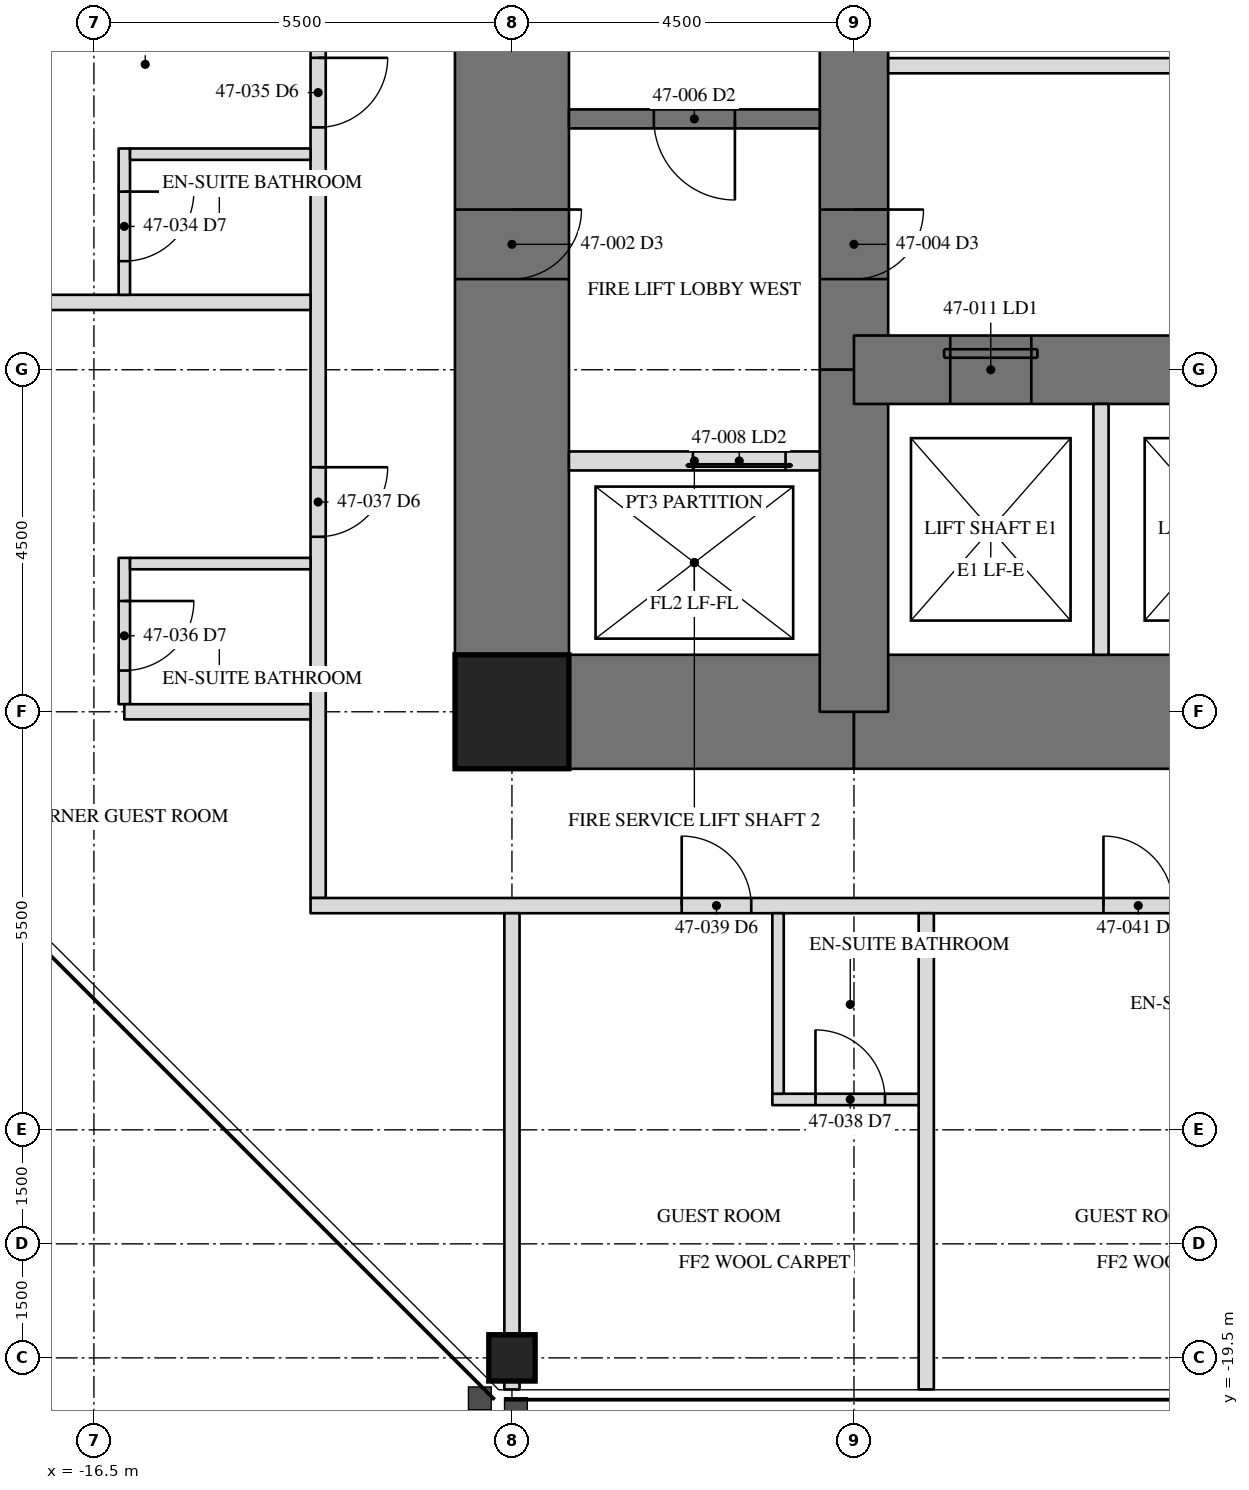
"""IFC4 building model, lengths in metres.
Left out: names, types, materials, properties, quantities, classifications, styles, units other than length and angle.
Written with IfcOpenShell. Run it as: python <this file> out.ifc"""

import sys

from ifc_helpers import new_model, si_unit, direction, frame, frame_2d, origin, origin_2d, place, context, subcontext, project, spatial, rectangle, hollow_rectangle, extrude, element, fill, save


model = new_model("IFC4")
c1 = context("Model", 3, precision=1e-05, world=origin(), true_north=direction((0.0, 1.0)))
c2 = subcontext(c1, "Body", "Model", "MODEL_VIEW")
j1 = project(units=[si_unit("LENGTHUNIT", "METRE"), si_unit("PLANEANGLEUNIT", "RADIAN")], contexts=[c1])
p1 = place(None, origin())
s1 = spatial("IfcSite", under=j1, at=p1, CompositionType="ELEMENT")
p2 = place(p1, origin())
s2 = spatial("IfcBuilding", under=s1, at=p2, CompositionType="ELEMENT")
p3 = place(p2, frame((0.0, 0.0, 201.2)))
s3 = spatial("IfcBuildingStorey", under=s2, at=p3, CompositionType="ELEMENT", Elevation=201.2)
p4 = place(p3, frame((-11.0, -19.5, 0.0), z_axis=(0.0, 0.0, 1.0), x_axis=(1.0, 0.0, 0.0)))
e1 = element("IfcColumn", 1, at=p4, inside=s3, PredefinedType="COLUMN", context=c2, shape_type="SweptSolid", body=[
    extrude(hollow_rectangle(XDim=0.61, YDim=0.61, WallThickness=0.076, at=origin_2d()), origin(), (0.0, 0.0, 1.0), 3.5),
])
p5 = place(p3, frame((-11.0, 11.0, 0.0), z_axis=(0.0, 0.0, 1.0), x_axis=(0.0, -1.0, 0.0)))
e2 = element("IfcWall", 2, at=p5, inside=s3, PredefinedType="SHEAR", context=c2, shape_type="SweptSolid", body=[
    extrude(rectangle(XDim=22.0, YDim=1.5, at=frame_2d((11.0, 0.0))), origin(), (0.0, 0.0, 1.0), 3.5),
])
p6 = place(p5, frame((15.393, 0.0, 0.0)))
e3 = element("IfcOpeningElement", 3, at=p6, cuts=e2, PredefinedType="OPENING", context=c2, shape_type="SweptSolid", body=[
    extrude(rectangle(XDim=0.915, YDim=2.134, at=frame_2d((0.458, 1.067))), frame((0.0, 0.76, 0.0), z_axis=(0.0, -1.0, 0.0), x_axis=(1.0, 0.0, 0.0)), (0.0, 0.0, 1.0), 1.52),
])
p7 = place(p3, frame((-11.0, -11.0, 0.0), z_axis=(0.0, 0.0, 1.0), x_axis=(1.0, 0.0, 0.0)))
e4 = element("IfcWall", 4, at=p7, inside=s3, PredefinedType="SHEAR", context=c2, shape_type="SweptSolid", body=[
    extrude(rectangle(XDim=4.5, YDim=1.5, at=frame_2d((2.25, 0.0))), origin(), (0.0, 0.0, 1.0), 3.5),
])
p8 = place(p3, frame((-6.5, -11.0, 0.0), z_axis=(0.0, 0.0, 1.0), x_axis=(1.0, 0.0, 0.0)))
e5 = element("IfcWall", 5, at=p8, inside=s3, PredefinedType="SHEAR", context=c2, shape_type="SweptSolid", body=[
    extrude(rectangle(XDim=13.0, YDim=1.5, at=frame_2d((6.5, 0.0))), origin(), (0.0, 0.0, 1.0), 3.5),
])
p9 = place(p3, frame((-6.5, 6.5, 0.0), z_axis=(0.0, 0.0, 1.0), x_axis=(0.0, -1.0, 0.0)))
e6 = element("IfcWall", 6, at=p9, inside=s3, PredefinedType="SHEAR", context=c2, shape_type="SweptSolid", body=[
    extrude(rectangle(XDim=13.0, YDim=0.9, at=frame_2d((6.5, 0.0))), origin(), (0.0, 0.0, 1.0), 3.5),
])
p10 = place(p9, frame((10.893, 0.0, 0.0)))
e7 = element("IfcOpeningElement", 7, at=p10, cuts=e6, PredefinedType="OPENING", context=c2, shape_type="SweptSolid", body=[
    extrude(rectangle(XDim=0.915, YDim=2.134, at=frame_2d((0.458, 1.067))), frame((0.0, 0.46, 0.0), z_axis=(0.0, -1.0, 0.0), x_axis=(1.0, 0.0, 0.0)), (0.0, 0.0, 1.0), 0.92),
])
p11 = place(p9, frame((0.61, 0.0, 0.0)))
e8 = element("IfcOpeningElement", 8, at=p11, cuts=e6, PredefinedType="OPENING", context=c2, shape_type="SweptSolid", body=[
    extrude(rectangle(XDim=0.915, YDim=2.134, at=frame_2d((0.458, 1.067))), frame((0.0, 0.46, 0.0), z_axis=(0.0, -1.0, 0.0), x_axis=(1.0, 0.0, 0.0)), (0.0, 0.0, 1.0), 0.92),
])
p12 = place(p3, frame((-6.5, -6.5, 0.0), z_axis=(0.0, 0.0, 1.0), x_axis=(0.0, -1.0, 0.0)))
e9 = element("IfcWall", 9, at=p12, inside=s3, PredefinedType="SHEAR", context=c2, shape_type="SweptSolid", body=[
    extrude(rectangle(XDim=4.5, YDim=0.9, at=frame_2d((2.25, 0.0))), origin(), (0.0, 0.0, 1.0), 3.5),
])
p13 = place(p3, frame((-6.5, -6.5, 0.0), z_axis=(0.0, 0.0, 1.0), x_axis=(1.0, 0.0, 0.0)))
e10 = element("IfcWall", 10, at=p13, inside=s3, PredefinedType="SHEAR", context=c2, shape_type="SweptSolid", body=[
    extrude(rectangle(XDim=13.0, YDim=0.9, at=frame_2d((6.5, 0.0))), origin(), (0.0, 0.0, 1.0), 3.5),
])
p14 = place(p13, frame((1.267, 0.0, 0.0)))
e11 = element("IfcOpeningElement", 11, at=p14, cuts=e10, PredefinedType="OPENING", context=c2, shape_type="SweptSolid", body=[
    extrude(rectangle(XDim=1.067, YDim=2.134, at=frame_2d((0.533, 1.067))), frame((0.0, 0.46, 0.0), z_axis=(0.0, -1.0, 0.0), x_axis=(1.0, 0.0, 0.0)), (0.0, 0.0, 1.0), 0.92),
])
p15 = place(p13, frame((4.342, 0.0, 0.0)))
e12 = element("IfcOpeningElement", 12, at=p15, cuts=e10, PredefinedType="OPENING", context=c2, shape_type="SweptSolid", body=[
    extrude(rectangle(XDim=1.067, YDim=2.134, at=frame_2d((0.533, 1.067))), frame((0.0, 0.46, 0.0), z_axis=(0.0, -1.0, 0.0), x_axis=(1.0, 0.0, 0.0)), (0.0, 0.0, 1.0), 0.92),
])
p16 = place(p3, frame((-11.0, -11.0, 0.0), z_axis=(0.0, 0.0, 1.0), x_axis=(1.0, 0.0, 0.0)))
e13 = element("IfcColumn", 13, at=p16, inside=s3, PredefinedType="COLUMN", context=c2, shape_type="SweptSolid", body=[
    extrude(hollow_rectangle(XDim=1.499, YDim=1.499, WallThickness=0.102, at=origin_2d()), origin(), (0.0, 0.0, 1.0), 3.5),
])
p17 = place(p3, frame((-6.95, -3.2, 0.0), z_axis=(0.0, 0.0, 1.0), x_axis=(-1.0, 0.0, 0.0)))
e14 = element("IfcWall", 14, at=p17, inside=s3, PredefinedType="SOLIDWALL", context=c2, shape_type="SweptSolid", body=[
    extrude(rectangle(XDim=3.3, YDim=0.25, at=frame_2d((1.65, 0.0))), origin(), (0.0, 0.0, 1.0), 3.31),
])
p18 = place(p17, frame((1.116, 0.0, 0.0)))
e15 = element("IfcOpeningElement", 15, at=p18, cuts=e14, PredefinedType="OPENING", context=c2, shape_type="SweptSolid", body=[
    extrude(rectangle(XDim=1.067, YDim=2.134, at=frame_2d((0.533, 1.067))), frame((0.0, 0.135, 0.0), z_axis=(0.0, -1.0, 0.0), x_axis=(1.0, 0.0, 0.0)), (0.0, 0.0, 1.0), 0.27),
])
p19 = place(p3, frame((-6.95, -7.7, 0.0), z_axis=(0.0, 0.0, 1.0), x_axis=(-1.0, 0.0, 0.0)))
e16 = element("IfcWall", 16, at=p19, inside=s3, PredefinedType="PARTITIONING", context=c2, shape_type="SweptSolid", body=[
    extrude(rectangle(XDim=3.3, YDim=0.25, at=frame_2d((1.65, 0.0))), origin(), (0.0, 0.0, 1.0), 3.31),
])
p20 = place(p19, frame((0.45, 0.0, 0.0)))
e17 = element("IfcOpeningElement", 17, at=p20, cuts=e16, PredefinedType="OPENING", context=c2, shape_type="SweptSolid", body=[
    extrude(rectangle(XDim=1.219, YDim=2.134, at=frame_2d((0.609, 1.067))), frame((0.0, 0.135, 0.0), z_axis=(0.0, -1.0, 0.0), x_axis=(1.0, 0.0, 0.0)), (0.0, 0.0, 1.0), 0.27),
])
p21 = place(p3, frame((6.05, -2.5, 0.0), z_axis=(0.0, 0.0, 1.0), x_axis=(-1.0, 0.0, 0.0)))
e18 = element("IfcWall", 18, at=p21, inside=s3, PredefinedType="PARTITIONING", context=c2, shape_type="SweptSolid", body=[
    extrude(rectangle(XDim=12.1, YDim=0.2, at=frame_2d((6.05, 0.0))), origin(), (0.0, 0.0, 1.0), 3.31),
])
p22 = place(p3, frame((-3.25, -10.25, 0.0), z_axis=(0.0, 0.0, 1.0), x_axis=(0.0, 1.0, 0.0)))
e19 = element("IfcWall", 19, at=p22, inside=s3, PredefinedType="PARTITIONING", context=c2, shape_type="SweptSolid", body=[
    extrude(rectangle(XDim=3.3, YDim=0.2, at=frame_2d((1.65, 0.0))), origin(), (0.0, 0.0, 1.0), 3.31),
])
p23 = place(p3, frame((-13.55, 13.65, 0.0), z_axis=(0.0, 0.0, 1.0), x_axis=(0.0, -1.0, 0.0)))
e20 = element("IfcWall", 20, at=p23, inside=s3, PredefinedType="PARTITIONING", context=c2, shape_type="SweptSolid", body=[
    extrude(rectangle(XDim=27.1, YDim=0.2, at=frame_2d((13.55, 0.0))), origin(), (0.0, 0.0, 1.0), 3.31),
])
p24 = place(p23, frame((4.884, 0.0, 0.0)))
e21 = element("IfcOpeningElement", 21, at=p24, cuts=e20, PredefinedType="OPENING", context=c2, shape_type="SweptSolid", body=[
    extrude(rectangle(XDim=0.915, YDim=2.134, at=frame_2d((0.458, 1.067))), frame((0.0, 0.11, 0.0), z_axis=(0.0, -1.0, 0.0), x_axis=(1.0, 0.0, 0.0)), (0.0, 0.0, 1.0), 0.22),
])
p25 = place(p23, frame((10.433, 0.0, 0.0)))
e22 = element("IfcOpeningElement", 22, at=p25, cuts=e20, PredefinedType="OPENING", context=c2, shape_type="SweptSolid", body=[
    extrude(rectangle(XDim=0.915, YDim=2.134, at=frame_2d((0.458, 1.067))), frame((0.0, 0.11, 0.0), z_axis=(0.0, -1.0, 0.0), x_axis=(1.0, 0.0, 0.0)), (0.0, 0.0, 1.0), 0.22),
])
p26 = place(p23, frame((16.046, 0.0, 0.0)))
e23 = element("IfcOpeningElement", 23, at=p26, cuts=e20, PredefinedType="OPENING", context=c2, shape_type="SweptSolid", body=[
    extrude(rectangle(XDim=0.915, YDim=2.134, at=frame_2d((0.458, 1.067))), frame((0.0, 0.11, 0.0), z_axis=(0.0, -1.0, 0.0), x_axis=(1.0, 0.0, 0.0)), (0.0, 0.0, 1.0), 0.22),
])
p27 = place(p23, frame((21.433, 0.0, 0.0)))
e24 = element("IfcOpeningElement", 24, at=p27, cuts=e20, PredefinedType="OPENING", context=c2, shape_type="SweptSolid", body=[
    extrude(rectangle(XDim=0.915, YDim=2.134, at=frame_2d((0.458, 1.067))), frame((0.0, 0.11, 0.0), z_axis=(0.0, -1.0, 0.0), x_axis=(1.0, 0.0, 0.0)), (0.0, 0.0, 1.0), 0.22),
])
p28 = place(p3, frame((-13.65, -13.55, 0.0), z_axis=(0.0, 0.0, 1.0), x_axis=(1.0, 0.0, 0.0)))
e25 = element("IfcWall", 25, at=p28, inside=s3, PredefinedType="PARTITIONING", context=c2, shape_type="SweptSolid", body=[
    extrude(rectangle(XDim=27.1, YDim=0.2, at=frame_2d((13.55, 0.0))), origin(), (0.0, 0.0, 1.0), 3.31),
])
p29 = place(p28, frame((4.884, 0.0, 0.0)))
e26 = element("IfcOpeningElement", 26, at=p29, cuts=e25, PredefinedType="OPENING", context=c2, shape_type="SweptSolid", body=[
    extrude(rectangle(XDim=0.915, YDim=2.134, at=frame_2d((0.458, 1.067))), frame((0.0, 0.11, 0.0), z_axis=(0.0, -1.0, 0.0), x_axis=(1.0, 0.0, 0.0)), (0.0, 0.0, 1.0), 0.22),
])
p30 = place(p28, frame((10.433, 0.0, 0.0)))
e27 = element("IfcOpeningElement", 27, at=p30, cuts=e25, PredefinedType="OPENING", context=c2, shape_type="SweptSolid", body=[
    extrude(rectangle(XDim=0.915, YDim=2.134, at=frame_2d((0.458, 1.067))), frame((0.0, 0.11, 0.0), z_axis=(0.0, -1.0, 0.0), x_axis=(1.0, 0.0, 0.0)), (0.0, 0.0, 1.0), 0.22),
])
p31 = place(p28, frame((16.046, 0.0, 0.0)))
e28 = element("IfcOpeningElement", 28, at=p31, cuts=e25, PredefinedType="OPENING", context=c2, shape_type="SweptSolid", body=[
    extrude(rectangle(XDim=0.915, YDim=2.134, at=frame_2d((0.458, 1.067))), frame((0.0, 0.11, 0.0), z_axis=(0.0, -1.0, 0.0), x_axis=(1.0, 0.0, 0.0)), (0.0, 0.0, 1.0), 0.22),
])
p32 = place(p28, frame((21.433, 0.0, 0.0)))
e29 = element("IfcOpeningElement", 29, at=p32, cuts=e25, PredefinedType="OPENING", context=c2, shape_type="SweptSolid", body=[
    extrude(rectangle(XDim=0.915, YDim=2.134, at=frame_2d((0.458, 1.067))), frame((0.0, 0.11, 0.0), z_axis=(0.0, -1.0, 0.0), x_axis=(1.0, 0.0, 0.0)), (0.0, 0.0, 1.0), 0.22),
])
p33 = place(p3, frame((-13.65, -5.614, 0.0), z_axis=(0.0, 0.0, 1.0), x_axis=(-1.0, 0.0, 0.0)))
e30 = element("IfcWall", 30, at=p33, inside=s3, PredefinedType="PARTITIONING", context=c2, shape_type="SweptSolid", body=[
    extrude(rectangle(XDim=6.265, YDim=0.2, at=frame_2d((3.133, 0.0))), origin(), (0.0, 0.0, 1.0), 3.31),
])
p34 = place(p3, frame((-16.1, -3.589, 0.0), z_axis=(0.0, 0.0, 1.0), x_axis=(0.0, -1.0, 0.0)))
e31 = element("IfcWall", 31, at=p34, inside=s3, PredefinedType="PARTITIONING", context=c2, shape_type="SweptSolid", body=[
    extrude(rectangle(XDim=1.925, YDim=0.15, at=frame_2d((0.962, 0.0))), origin(), (0.0, 0.0, 1.0), 3.31),
])
p35 = place(p34, frame((0.567, 0.0, 0.0)))
e32 = element("IfcOpeningElement", 32, at=p35, cuts=e31, PredefinedType="OPENING", context=c2, shape_type="SweptSolid", body=[
    extrude(rectangle(XDim=0.915, YDim=2.032, at=frame_2d((0.458, 1.016))), frame((0.0, 0.085, 0.0), z_axis=(0.0, -1.0, 0.0), x_axis=(1.0, 0.0, 0.0)), (0.0, 0.0, 1.0), 0.17),
])
p36 = place(p3, frame((-13.65, -3.664, 0.0), z_axis=(0.0, 0.0, 1.0), x_axis=(-1.0, 0.0, 0.0)))
e33 = element("IfcWall", 33, at=p36, inside=s3, PredefinedType="PARTITIONING", context=c2, shape_type="SweptSolid", body=[
    extrude(rectangle(XDim=2.375, YDim=0.15, at=frame_2d((1.188, 0.0))), origin(), (0.0, 0.0, 1.0), 2.703),
])
p37 = place(p3, frame((-16.1, -8.975, 0.0), z_axis=(0.0, 0.0, 1.0), x_axis=(0.0, -1.0, 0.0)))
e34 = element("IfcWall", 34, at=p37, inside=s3, PredefinedType="PARTITIONING", context=c2, shape_type="SweptSolid", body=[
    extrude(rectangle(XDim=1.925, YDim=0.15, at=frame_2d((0.962, 0.0))), origin(), (0.0, 0.0, 1.0), 3.31),
])
p38 = place(p37, frame((0.567, 0.0, 0.0)))
e35 = element("IfcOpeningElement", 35, at=p38, cuts=e34, PredefinedType="OPENING", context=c2, shape_type="SweptSolid", body=[
    extrude(rectangle(XDim=0.915, YDim=2.032, at=frame_2d((0.458, 1.016))), frame((0.0, 0.085, 0.0), z_axis=(0.0, -1.0, 0.0), x_axis=(1.0, 0.0, 0.0)), (0.0, 0.0, 1.0), 0.17),
])
p39 = place(p3, frame((-13.65, -9.05, 0.0), z_axis=(0.0, 0.0, 1.0), x_axis=(-1.0, 0.0, 0.0)))
e36 = element("IfcWall", 36, at=p39, inside=s3, PredefinedType="PARTITIONING", context=c2, shape_type="SweptSolid", body=[
    extrude(rectangle(XDim=2.375, YDim=0.15, at=frame_2d((1.188, 0.0))), origin(), (0.0, 0.0, 1.0), 3.31),
])
p40 = place(p3, frame((-13.65, -11.0, 0.0), z_axis=(0.0, 0.0, 1.0), x_axis=(-1.0, 0.0, 0.0)))
e37 = element("IfcWall", 37, at=p40, inside=s3, PredefinedType="PARTITIONING", context=c2, shape_type="SweptSolid", body=[
    extrude(rectangle(XDim=2.45, YDim=0.2, at=frame_2d((1.225, 0.0))), origin(), (0.0, 0.0, 1.0), 2.802),
])
p41 = place(p3, frame((-11.0, -13.65, 0.0), z_axis=(0.0, 0.0, 1.0), x_axis=(0.0, -1.0, 0.0)))
e38 = element("IfcWall", 38, at=p41, inside=s3, PredefinedType="PARTITIONING", context=c2, shape_type="SweptSolid", body=[
    extrude(rectangle(XDim=6.265, YDim=0.2, at=frame_2d((3.133, 0.0))), origin(), (0.0, 0.0, 1.0), 2.802),
])
p42 = place(p3, frame((-5.549, -13.65, 0.0), z_axis=(0.0, 0.0, 1.0), x_axis=(0.0, -1.0, 0.0)))
e39 = element("IfcWall", 39, at=p42, inside=s3, PredefinedType="PARTITIONING", context=c2, shape_type="SweptSolid", body=[
    extrude(rectangle(XDim=6.265, YDim=0.2, at=frame_2d((3.133, 0.0))), origin(), (0.0, 0.0, 1.0), 3.31),
])
p43 = place(p3, frame((-7.574, -16.1, 0.0), z_axis=(0.0, 0.0, 1.0), x_axis=(1.0, 0.0, 0.0)))
e40 = element("IfcWall", 40, at=p43, inside=s3, PredefinedType="PARTITIONING", context=c2, shape_type="SweptSolid", body=[
    extrude(rectangle(XDim=1.925, YDim=0.15, at=frame_2d((0.962, 0.0))), origin(), (0.0, 0.0, 1.0), 3.31),
])
p44 = place(p43, frame((0.567, 0.0, 0.0)))
e41 = element("IfcOpeningElement", 41, at=p44, cuts=e40, PredefinedType="OPENING", context=c2, shape_type="SweptSolid", body=[
    extrude(rectangle(XDim=0.915, YDim=2.032, at=frame_2d((0.458, 1.016))), frame((0.0, 0.085, 0.0), z_axis=(0.0, -1.0, 0.0), x_axis=(1.0, 0.0, 0.0)), (0.0, 0.0, 1.0), 0.17),
])
p45 = place(p3, frame((-7.499, -13.65, 0.0), z_axis=(0.0, 0.0, 1.0), x_axis=(0.0, -1.0, 0.0)))
e42 = element("IfcWall", 42, at=p45, inside=s3, PredefinedType="PARTITIONING", context=c2, shape_type="SweptSolid", body=[
    extrude(rectangle(XDim=2.375, YDim=0.15, at=frame_2d((1.188, 0.0))), origin(), (0.0, 0.0, 1.0), 3.31),
])
p46 = place(p6, origin())
e43 = element("IfcDoor", 43, at=p46, inside=s3, OperationType="SINGLE_SWING_RIGHT", PredefinedType="DOOR", context=c2, shape_type="SweptSolid", body=[
    extrude(rectangle(XDim=0.915, YDim=2.134, at=frame_2d((0.458, 1.067))), frame((0.0, -0.675, 0.0), z_axis=(0.0, -1.0, 0.0), x_axis=(1.0, 0.0, 0.0)), (0.0, 0.0, 1.0), 0.05),
])
fill(e3, e43)
p47 = place(p10, origin())
e44 = element("IfcDoor", 44, at=p47, inside=s3, OperationType="SINGLE_SWING_RIGHT", PredefinedType="DOOR", context=c2, shape_type="SweptSolid", body=[
    extrude(rectangle(XDim=0.915, YDim=2.134, at=frame_2d((0.458, 1.067))), frame((0.0, -0.375, 0.0), z_axis=(0.0, -1.0, 0.0), x_axis=(1.0, 0.0, 0.0)), (0.0, 0.0, 1.0), 0.05),
])
fill(e7, e44)
p48 = place(p18, origin())
e45 = element("IfcDoor", 45, at=p48, inside=s3, OperationType="SINGLE_SWING_LEFT", PredefinedType="DOOR", context=c2, shape_type="SweptSolid", body=[
    extrude(rectangle(XDim=1.067, YDim=2.134, at=frame_2d((0.533, 1.067))), frame((0.0, 0.025, 0.0), z_axis=(0.0, -1.0, 0.0), x_axis=(1.0, 0.0, 0.0)), (0.0, 0.0, 1.0), 0.05),
])
fill(e15, e45)
p49 = place(p20, origin())
e46 = element("IfcDoor", 46, at=p49, inside=s3, OperationType="SLIDING_TO_LEFT", PredefinedType="DOOR", context=c2, shape_type="SweptSolid", body=[
    extrude(rectangle(XDim=1.219, YDim=2.134, at=frame_2d((0.609, 1.067))), frame((0.0, 0.025, 0.0), z_axis=(0.0, -1.0, 0.0), x_axis=(1.0, 0.0, 0.0)), (0.0, 0.0, 1.0), 0.05),
])
fill(e17, e46)
p50 = place(p14, origin())
e47 = element("IfcDoor", 47, at=p50, inside=s3, OperationType="SLIDING_TO_LEFT", PredefinedType="DOOR", context=c2, shape_type="SweptSolid", body=[
    extrude(rectangle(XDim=1.067, YDim=2.134, at=frame_2d((0.533, 1.067))), frame((0.0, -0.375, 0.0), z_axis=(0.0, -1.0, 0.0), x_axis=(1.0, 0.0, 0.0)), (0.0, 0.0, 1.0), 0.05),
])
fill(e11, e47)
p51 = place(p35, origin())
e48 = element("IfcDoor", 48, at=p51, inside=s3, OperationType="SINGLE_SWING_LEFT", PredefinedType="DOOR", context=c2, shape_type="SweptSolid", body=[
    extrude(rectangle(XDim=0.915, YDim=2.032, at=frame_2d((0.458, 1.016))), frame((0.0, 0.025, 0.0), z_axis=(0.0, -1.0, 0.0), x_axis=(1.0, 0.0, 0.0)), (0.0, 0.0, 1.0), 0.05),
])
fill(e32, e48)
p52 = place(p26, origin())
e49 = element("IfcDoor", 49, at=p52, inside=s3, OperationType="SINGLE_SWING_LEFT", PredefinedType="DOOR", context=c2, shape_type="SweptSolid", body=[
    extrude(rectangle(XDim=0.915, YDim=2.134, at=frame_2d((0.458, 1.067))), frame((0.0, 0.025, 0.0), z_axis=(0.0, -1.0, 0.0), x_axis=(1.0, 0.0, 0.0)), (0.0, 0.0, 1.0), 0.05),
])
fill(e23, e49)
p53 = place(p38, origin())
e50 = element("IfcDoor", 50, at=p53, inside=s3, OperationType="SINGLE_SWING_LEFT", PredefinedType="DOOR", context=c2, shape_type="SweptSolid", body=[
    extrude(rectangle(XDim=0.915, YDim=2.032, at=frame_2d((0.458, 1.016))), frame((0.0, 0.025, 0.0), z_axis=(0.0, -1.0, 0.0), x_axis=(1.0, 0.0, 0.0)), (0.0, 0.0, 1.0), 0.05),
])
fill(e35, e50)
p54 = place(p27, origin())
e51 = element("IfcDoor", 51, at=p54, inside=s3, OperationType="SINGLE_SWING_LEFT", PredefinedType="DOOR", context=c2, shape_type="SweptSolid", body=[
    extrude(rectangle(XDim=0.915, YDim=2.134, at=frame_2d((0.458, 1.067))), frame((0.0, 0.025, 0.0), z_axis=(0.0, -1.0, 0.0), x_axis=(1.0, 0.0, 0.0)), (0.0, 0.0, 1.0), 0.05),
])
fill(e24, e51)
p55 = place(p44, origin())
e52 = element("IfcDoor", 52, at=p55, inside=s3, OperationType="SINGLE_SWING_LEFT", PredefinedType="DOOR", context=c2, shape_type="SweptSolid", body=[
    extrude(rectangle(XDim=0.915, YDim=2.032, at=frame_2d((0.458, 1.016))), frame((0.0, 0.025, 0.0), z_axis=(0.0, -1.0, 0.0), x_axis=(1.0, 0.0, 0.0)), (0.0, 0.0, 1.0), 0.05),
])
fill(e41, e52)
p56 = place(p29, origin())
e53 = element("IfcDoor", 53, at=p56, inside=s3, OperationType="SINGLE_SWING_LEFT", PredefinedType="DOOR", context=c2, shape_type="SweptSolid", body=[
    extrude(rectangle(XDim=0.915, YDim=2.134, at=frame_2d((0.458, 1.067))), frame((0.0, 0.025, 0.0), z_axis=(0.0, -1.0, 0.0), x_axis=(1.0, 0.0, 0.0)), (0.0, 0.0, 1.0), 0.05),
])
fill(e26, e53)
p57 = place(p30, origin())
e54 = element("IfcDoor", 54, at=p57, inside=s3, OperationType="SINGLE_SWING_LEFT", PredefinedType="DOOR", context=c2, shape_type="SweptSolid", body=[
    extrude(rectangle(XDim=0.915, YDim=2.134, at=frame_2d((0.458, 1.067))), frame((0.0, 0.025, 0.0), z_axis=(0.0, -1.0, 0.0), x_axis=(1.0, 0.0, 0.0)), (0.0, 0.0, 1.0), 0.05),
])
fill(e27, e54)
save(model, sys.argv[1])
